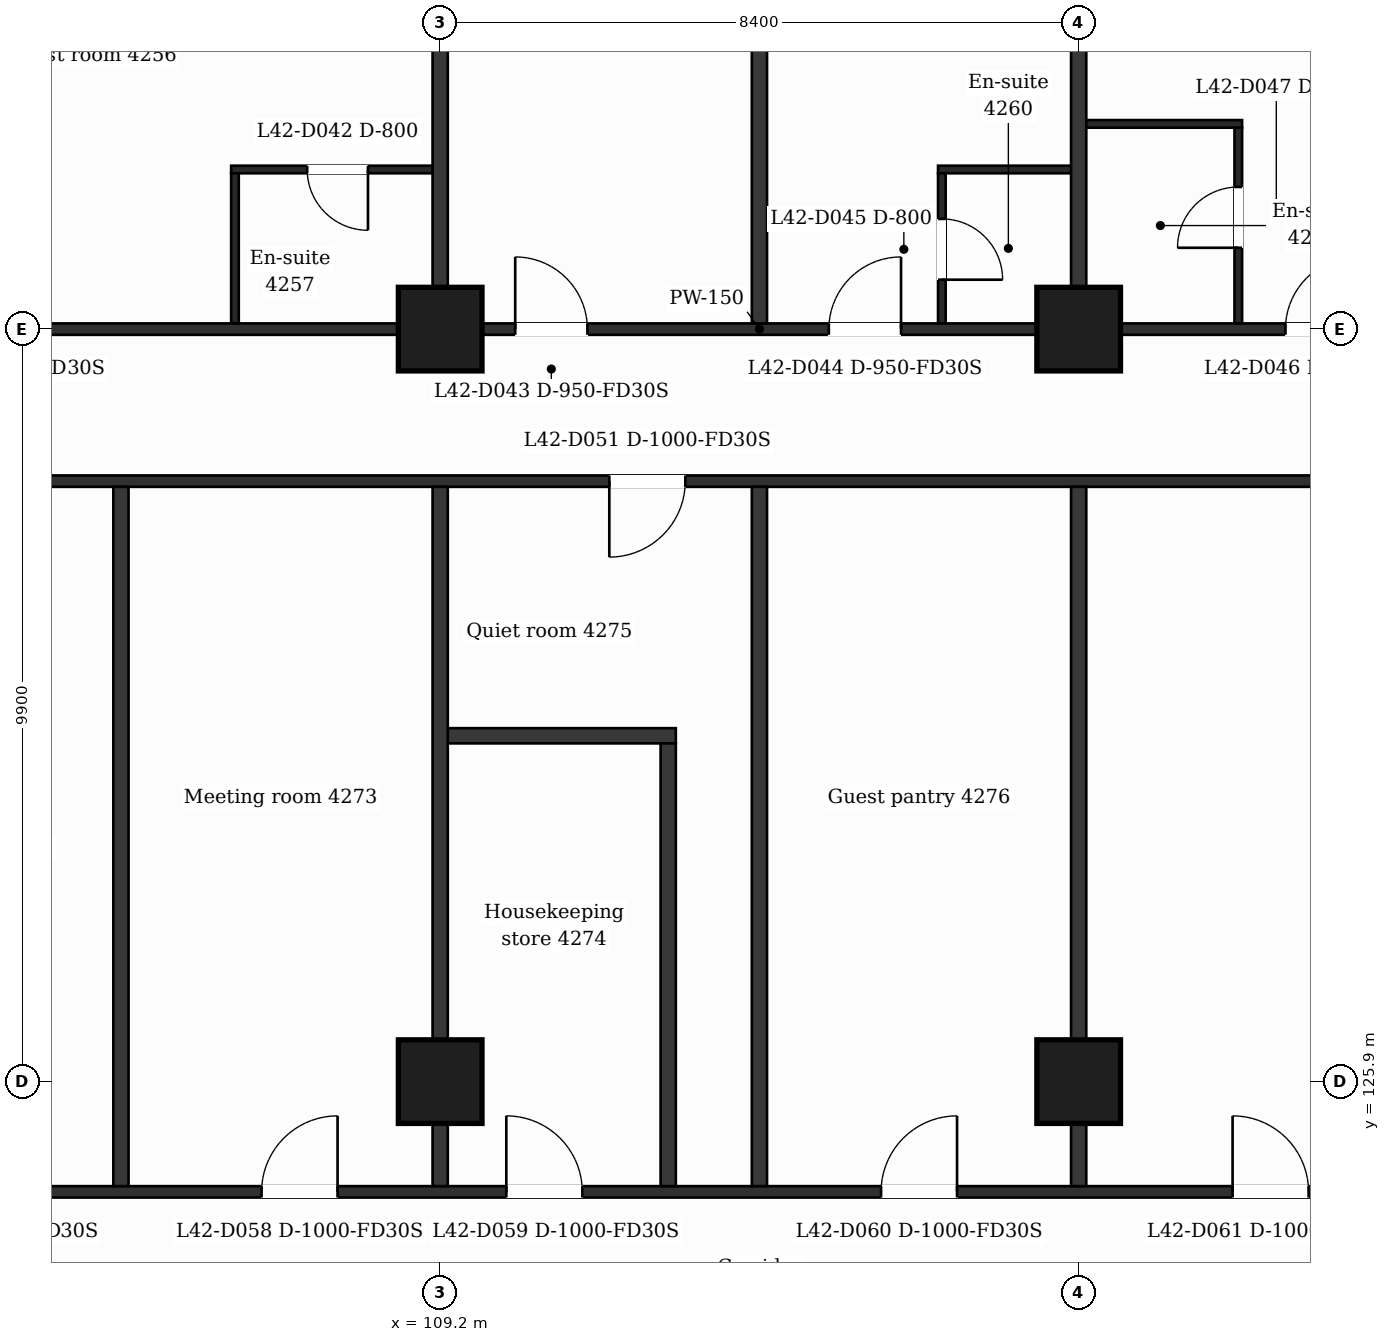
"""IFC4 building model, lengths in metres.
Left out: names, types, materials, properties, quantities, classifications, styles, units other than length and angle.
Written with IfcOpenShell. Run it as: python <this file> out.ifc"""

import sys

from ifc_helpers import new_model, si_unit, direction, frame, frame_2d, origin, origin_2d, place, context, subcontext, project, spatial, rectangle, extrude, element, fill, save


model = new_model("IFC4")
c1 = context("Model", 3, precision=1e-05, world=origin(), true_north=direction((0.0, 1.0)))
c2 = subcontext(c1, "Body", "Model", "MODEL_VIEW")
j1 = project(units=[si_unit("LENGTHUNIT", "METRE"), si_unit("PLANEANGLEUNIT", "RADIAN")], contexts=[c1])
p1 = place(None, origin())
s1 = spatial("IfcSite", under=j1, at=p1, CompositionType="ELEMENT")
p2 = place(p1, origin())
s2 = spatial("IfcBuilding", under=s1, at=p2, CompositionType="ELEMENT")
p3 = place(p2, frame((0.0, 0.0, 177.4)))
s3 = spatial("IfcBuildingStorey", under=s2, at=p3, CompositionType="ELEMENT", Elevation=177.4)
for number, where, z_axis, x_axis in (
    (1, (109.2, 125.9, 0.0), (0.0, 0.0, 1.0), (1.0, 0.0, 0.0)),
    (2, (117.6, 125.9, 0.0), (0.0, 0.0, 1.0), (1.0, 0.0, 0.0)),
    (3, (109.2, 135.8, 0.0), (0.0, 0.0, 1.0), (1.0, 0.0, 0.0)),
    (4, (117.6, 135.8, 0.0), (0.0, 0.0, 1.0), (1.0, 0.0, 0.0)),
):
    element("IfcColumn", number, at=place(p3, frame(where, z_axis=z_axis, x_axis=x_axis)), inside=s3, PredefinedType="COLUMN", context=c2, shape_type="SweptSolid", body=[
        extrude(rectangle(XDim=1.1, YDim=1.1, at=origin_2d()), origin(), (0.0, 0.0, 1.0), 3.7),
    ])
p4 = place(p3, frame((100.8, 124.45, 0.0), z_axis=(0.0, 0.0, 1.0), x_axis=(1.0, 0.0, 0.0)))
e5 = element("IfcWall", 5, at=p4, inside=s3, PredefinedType="PARTITIONING", context=c2, shape_type="SweptSolid", body=[
    extrude(rectangle(XDim=25.2, YDim=0.15, at=frame_2d((12.6, 0.0))), origin(), (0.0, 0.0, 1.0), 3.38),
])
p5 = place(p4, frame((0.975, 0.0, 0.0)))
e6 = element("IfcOpeningElement", 6, at=p5, cuts=e5, PredefinedType="OPENING", context=c2, shape_type="SweptSolid", body=[
    extrude(rectangle(XDim=1.0, YDim=2.1, at=frame_2d((0.5, 1.05))), frame((0.0, 0.085, 0.0), z_axis=(0.0, -1.0, 0.0), x_axis=(1.0, 0.0, 0.0)), (0.0, 0.0, 1.0), 0.17),
])
p6 = place(p4, frame((6.05, 0.0, 0.0)))
e7 = element("IfcOpeningElement", 7, at=p6, cuts=e5, PredefinedType="OPENING", context=c2, shape_type="SweptSolid", body=[
    extrude(rectangle(XDim=1.0, YDim=2.1, at=frame_2d((0.5, 1.05))), frame((0.0, 0.085, 0.0), z_axis=(0.0, -1.0, 0.0), x_axis=(1.0, 0.0, 0.0)), (0.0, 0.0, 1.0), 0.17),
])
p7 = place(p4, frame((9.27, 0.0, 0.0)))
e8 = element("IfcOpeningElement", 8, at=p7, cuts=e5, PredefinedType="OPENING", context=c2, shape_type="SweptSolid", body=[
    extrude(rectangle(XDim=1.0, YDim=2.1, at=frame_2d((0.5, 1.05))), frame((0.0, 0.085, 0.0), z_axis=(0.0, -1.0, 0.0), x_axis=(1.0, 0.0, 0.0)), (0.0, 0.0, 1.0), 0.17),
])
p8 = place(p4, frame((14.2, 0.0, 0.0)))
e9 = element("IfcOpeningElement", 9, at=p8, cuts=e5, PredefinedType="OPENING", context=c2, shape_type="SweptSolid", body=[
    extrude(rectangle(XDim=1.0, YDim=2.1, at=frame_2d((0.5, 1.05))), frame((0.0, 0.085, 0.0), z_axis=(0.0, -1.0, 0.0), x_axis=(1.0, 0.0, 0.0)), (0.0, 0.0, 1.0), 0.17),
])
p9 = place(p4, frame((18.825, 0.0, 0.0)))
e10 = element("IfcOpeningElement", 10, at=p9, cuts=e5, PredefinedType="OPENING", context=c2, shape_type="SweptSolid", body=[
    extrude(rectangle(XDim=1.0, YDim=2.1, at=frame_2d((0.5, 1.05))), frame((0.0, 0.085, 0.0), z_axis=(0.0, -1.0, 0.0), x_axis=(1.0, 0.0, 0.0)), (0.0, 0.0, 1.0), 0.17),
])
p10 = place(p3, frame((109.2, 130.45, 0.0), z_axis=(0.0, 0.0, 1.0), x_axis=(1.0, 0.0, 0.0)))
e11 = element("IfcWall", 11, at=p10, inside=s3, PredefinedType="PARTITIONING", context=c2, shape_type="SweptSolid", body=[
    extrude(rectangle(XDim=3.1, YDim=0.2, at=frame_2d((1.55, 0.0))), origin(), (0.0, 0.0, 1.0), 3.38),
])
p11 = place(p3, frame((100.725, 133.8, 0.0), z_axis=(0.0, 0.0, 1.0), x_axis=(1.0, 0.0, 0.0)))
e12 = element("IfcWall", 12, at=p11, inside=s3, PredefinedType="PARTITIONING", context=c2, shape_type="SweptSolid", body=[
    extrude(rectangle(XDim=25.35, YDim=0.15, at=frame_2d((12.675, 0.0))), origin(), (0.0, 0.0, 1.0), 3.38),
])
p12 = place(p11, frame((10.7, 0.0, 0.0)))
e13 = element("IfcOpeningElement", 13, at=p12, cuts=e12, PredefinedType="OPENING", context=c2, shape_type="SweptSolid", body=[
    extrude(rectangle(XDim=1.0, YDim=2.1, at=frame_2d((0.5, 1.05))), frame((0.0, 0.085, 0.0), z_axis=(0.0, -1.0, 0.0), x_axis=(1.0, 0.0, 0.0)), (0.0, 0.0, 1.0), 0.17),
])
p13 = place(p3, frame((90.895, 135.8, 0.0), z_axis=(0.0, 0.0, 1.0), x_axis=(1.0, 0.0, 0.0)))
e14 = element("IfcWall", 14, at=p13, inside=s3, PredefinedType="PARTITIONING", context=c2, shape_type="SweptSolid", body=[
    extrude(rectangle(XDim=45.011, YDim=0.15, at=frame_2d((22.505, 0.0))), origin(), (0.0, 0.0, 1.0), 3.38),
])
p14 = place(p13, frame((6.906, 0.0, 0.0)))
e15 = element("IfcOpeningElement", 15, at=p14, cuts=e14, PredefinedType="OPENING", context=c2, shape_type="SweptSolid", body=[
    extrude(rectangle(XDim=1.0, YDim=2.1, at=frame_2d((0.5, 1.05))), frame((0.0, 0.085, 0.0), z_axis=(0.0, -1.0, 0.0), x_axis=(1.0, 0.0, 0.0)), (0.0, 0.0, 1.0), 0.17),
])
p15 = place(p13, frame((11.875, 0.0, 0.0)))
e16 = element("IfcOpeningElement", 16, at=p15, cuts=e14, PredefinedType="OPENING", context=c2, shape_type="SweptSolid", body=[
    extrude(rectangle(XDim=0.95, YDim=2.1, at=frame_2d((0.475, 1.05))), frame((0.0, 0.085, 0.0), z_axis=(0.0, -1.0, 0.0), x_axis=(1.0, 0.0, 0.0)), (0.0, 0.0, 1.0), 0.17),
])
p16 = place(p13, frame((19.292, 0.0, 0.0)))
e17 = element("IfcOpeningElement", 17, at=p16, cuts=e14, PredefinedType="OPENING", context=c2, shape_type="SweptSolid", body=[
    extrude(rectangle(XDim=0.95, YDim=2.1, at=frame_2d((0.475, 1.05))), frame((0.0, 0.085, 0.0), z_axis=(0.0, -1.0, 0.0), x_axis=(1.0, 0.0, 0.0)), (0.0, 0.0, 1.0), 0.17),
])
p17 = place(p13, frame((23.418, 0.0, 0.0)))
e18 = element("IfcOpeningElement", 18, at=p17, cuts=e14, PredefinedType="OPENING", context=c2, shape_type="SweptSolid", body=[
    extrude(rectangle(XDim=0.95, YDim=2.1, at=frame_2d((0.475, 1.05))), frame((0.0, 0.085, 0.0), z_axis=(0.0, -1.0, 0.0), x_axis=(1.0, 0.0, 0.0)), (0.0, 0.0, 1.0), 0.17),
])
p18 = place(p13, frame((29.425, 0.0, 0.0)))
e19 = element("IfcOpeningElement", 19, at=p18, cuts=e14, PredefinedType="OPENING", context=c2, shape_type="SweptSolid", body=[
    extrude(rectangle(XDim=0.95, YDim=2.1, at=frame_2d((0.475, 1.05))), frame((0.0, 0.085, 0.0), z_axis=(0.0, -1.0, 0.0), x_axis=(1.0, 0.0, 0.0)), (0.0, 0.0, 1.0), 0.17),
])
p19 = place(p13, frame((31.63, 0.0, 0.0)))
e20 = element("IfcOpeningElement", 20, at=p19, cuts=e14, PredefinedType="OPENING", context=c2, shape_type="SweptSolid", body=[
    extrude(rectangle(XDim=0.95, YDim=2.1, at=frame_2d((0.475, 1.05))), frame((0.0, 0.085, 0.0), z_axis=(0.0, -1.0, 0.0), x_axis=(1.0, 0.0, 0.0)), (0.0, 0.0, 1.0), 0.17),
])
p20 = place(p13, frame((39.814, 0.0, 0.0)))
e21 = element("IfcOpeningElement", 21, at=p20, cuts=e14, PredefinedType="OPENING", context=c2, shape_type="SweptSolid", body=[
    extrude(rectangle(XDim=0.95, YDim=2.1, at=frame_2d((0.475, 1.05))), frame((0.0, 0.085, 0.0), z_axis=(0.0, -1.0, 0.0), x_axis=(1.0, 0.0, 0.0)), (0.0, 0.0, 1.0), 0.17),
])
p21 = place(p3, frame((106.45, 137.9, 0.0), z_axis=(0.0, 0.0, 1.0), x_axis=(1.0, 0.0, 0.0)))
e22 = element("IfcWall", 22, at=p21, inside=s3, PredefinedType="PARTITIONING", context=c2, shape_type="SweptSolid", body=[
    extrude(rectangle(XDim=2.75, YDim=0.1, at=frame_2d((1.375, 0.0))), origin(), (0.0, 0.0, 1.0), 3.38),
])
p22 = place(p21, frame((1.0, 0.0, 0.0)))
e23 = element("IfcOpeningElement", 23, at=p22, cuts=e22, PredefinedType="OPENING", context=c2, shape_type="SweptSolid", body=[
    extrude(rectangle(XDim=0.8, YDim=2.1, at=frame_2d((0.4, 1.05))), frame((0.0, 0.06, 0.0), z_axis=(0.0, -1.0, 0.0), x_axis=(1.0, 0.0, 0.0)), (0.0, 0.0, 1.0), 0.12),
])
p23 = place(p3, frame((115.75, 137.9, 0.0), z_axis=(0.0, 0.0, 1.0), x_axis=(1.0, 0.0, 0.0)))
e24 = element("IfcWall", 24, at=p23, inside=s3, PredefinedType="PARTITIONING", context=c2, shape_type="SweptSolid", body=[
    extrude(rectangle(XDim=1.85, YDim=0.1, at=frame_2d((0.925, 0.0))), origin(), (0.0, 0.0, 1.0), 3.38),
])
p24 = place(p3, frame((117.6, 138.5, 0.0), z_axis=(0.0, 0.0, 1.0), x_axis=(1.0, 0.0, 0.0)))
e25 = element("IfcWall", 25, at=p24, inside=s3, PredefinedType="PARTITIONING", context=c2, shape_type="SweptSolid", body=[
    extrude(rectangle(XDim=2.15, YDim=0.1, at=frame_2d((1.075, 0.0))), origin(), (0.0, 0.0, 1.0), 3.38),
])
p25 = place(p3, frame((105.0, 124.525, 0.0), z_axis=(0.0, 0.0, 1.0), x_axis=(0.0, 1.0, 0.0)))
e26 = element("IfcWall", 26, at=p25, inside=s3, PredefinedType="PARTITIONING", context=c2, shape_type="SweptSolid", body=[
    extrude(rectangle(XDim=9.2, YDim=0.2, at=frame_2d((4.6, 0.0))), origin(), (0.0, 0.0, 1.0), 3.38),
])
p26 = place(p3, frame((106.5, 135.875, 0.0), z_axis=(0.0, 0.0, 1.0), x_axis=(0.0, 1.0, 0.0)))
e27 = element("IfcWall", 27, at=p26, inside=s3, PredefinedType="PARTITIONING", context=c2, shape_type="SweptSolid", body=[
    extrude(rectangle(XDim=1.975, YDim=0.1, at=frame_2d((0.988, 0.0))), origin(), (0.0, 0.0, 1.0), 3.38),
])
p27 = place(p3, frame((109.2, 124.525, 0.0), z_axis=(0.0, 0.0, 1.0), x_axis=(0.0, 1.0, 0.0)))
e28 = element("IfcWall", 28, at=p27, inside=s3, PredefinedType="PARTITIONING", context=c2, shape_type="SweptSolid", body=[
    extrude(rectangle(XDim=9.2, YDim=0.2, at=frame_2d((4.6, 0.0))), origin(), (0.0, 0.0, 1.0), 3.38),
])
p28 = place(p3, frame((109.2, 135.875, 0.0), z_axis=(0.0, 0.0, 1.0), x_axis=(0.0, 1.0, 0.0)))
e29 = element("IfcWall", 29, at=p28, inside=s3, PredefinedType="PARTITIONING", context=c2, shape_type="SweptSolid", body=[
    extrude(rectangle(XDim=7.135, YDim=0.2, at=frame_2d((3.567, 0.0))), origin(), (0.0, 0.0, 1.0), 3.38),
])
p29 = place(p3, frame((112.2, 124.525, 0.0), z_axis=(0.0, 0.0, 1.0), x_axis=(0.0, 1.0, 0.0)))
e30 = element("IfcWall", 30, at=p29, inside=s3, PredefinedType="PARTITIONING", context=c2, shape_type="SweptSolid", body=[
    extrude(rectangle(XDim=5.825, YDim=0.2, at=frame_2d((2.913, 0.0))), origin(), (0.0, 0.0, 1.0), 3.38),
])
p30 = place(p3, frame((113.4, 124.525, 0.0), z_axis=(0.0, 0.0, 1.0), x_axis=(0.0, 1.0, 0.0)))
e31 = element("IfcWall", 31, at=p30, inside=s3, PredefinedType="PARTITIONING", context=c2, shape_type="SweptSolid", body=[
    extrude(rectangle(XDim=9.2, YDim=0.2, at=frame_2d((4.6, 0.0))), origin(), (0.0, 0.0, 1.0), 3.38),
])
p31 = place(p3, frame((113.4, 135.875, 0.0), z_axis=(0.0, 0.0, 1.0), x_axis=(0.0, 1.0, 0.0)))
e32 = element("IfcWall", 32, at=p31, inside=s3, PredefinedType="PARTITIONING", context=c2, shape_type="SweptSolid", body=[
    extrude(rectangle(XDim=8.085, YDim=0.2, at=frame_2d((4.042, 0.0))), origin(), (0.0, 0.0, 1.0), 3.38),
])
p32 = place(p3, frame((115.8, 135.875, 0.0), z_axis=(0.0, 0.0, 1.0), x_axis=(0.0, 1.0, 0.0)))
e33 = element("IfcWall", 33, at=p32, inside=s3, PredefinedType="PARTITIONING", context=c2, shape_type="SweptSolid", body=[
    extrude(rectangle(XDim=1.975, YDim=0.1, at=frame_2d((0.988, 0.0))), origin(), (0.0, 0.0, 1.0), 3.38),
])
p33 = place(p32, frame((0.575, 0.0, 0.0)))
e34 = element("IfcOpeningElement", 34, at=p33, cuts=e33, PredefinedType="OPENING", context=c2, shape_type="SweptSolid", body=[
    extrude(rectangle(XDim=0.8, YDim=2.1, at=frame_2d((0.4, 1.05))), frame((0.0, 0.06, 0.0), z_axis=(0.0, -1.0, 0.0), x_axis=(1.0, 0.0, 0.0)), (0.0, 0.0, 1.0), 0.12),
])
p34 = place(p3, frame((117.6, 124.525, 0.0), z_axis=(0.0, 0.0, 1.0), x_axis=(0.0, 1.0, 0.0)))
e35 = element("IfcWall", 35, at=p34, inside=s3, PredefinedType="PARTITIONING", context=c2, shape_type="SweptSolid", body=[
    extrude(rectangle(XDim=9.2, YDim=0.2, at=frame_2d((4.6, 0.0))), origin(), (0.0, 0.0, 1.0), 3.38),
])
p35 = place(p3, frame((117.6, 135.875, 0.0), z_axis=(0.0, 0.0, 1.0), x_axis=(0.0, 1.0, 0.0)))
e36 = element("IfcWall", 36, at=p35, inside=s3, PredefinedType="PARTITIONING", context=c2, shape_type="SweptSolid", body=[
    extrude(rectangle(XDim=7.135, YDim=0.2, at=frame_2d((3.567, 0.0))), origin(), (0.0, 0.0, 1.0), 3.38),
])
p36 = place(p3, frame((119.7, 135.875, 0.0), z_axis=(0.0, 0.0, 1.0), x_axis=(0.0, 1.0, 0.0)))
e37 = element("IfcWall", 37, at=p36, inside=s3, PredefinedType="PARTITIONING", context=c2, shape_type="SweptSolid", body=[
    extrude(rectangle(XDim=2.575, YDim=0.1, at=frame_2d((1.288, 0.0))), origin(), (0.0, 0.0, 1.0), 3.38),
])
p37 = place(p36, frame((0.995, 0.0, 0.0)))
e38 = element("IfcOpeningElement", 38, at=p37, cuts=e37, PredefinedType="OPENING", context=c2, shape_type="SweptSolid", body=[
    extrude(rectangle(XDim=0.8, YDim=2.1, at=frame_2d((0.4, 1.05))), frame((0.0, 0.06, 0.0), z_axis=(0.0, -1.0, 0.0), x_axis=(1.0, 0.0, 0.0)), (0.0, 0.0, 1.0), 0.12),
])
p38 = place(p22, origin())
e39 = element("IfcDoor", 39, at=p38, inside=s3, OperationType="SINGLE_SWING_RIGHT", PredefinedType="DOOR", context=c2, shape_type="SweptSolid", body=[
    extrude(rectangle(XDim=0.8, YDim=2.1, at=frame_2d((0.4, 1.05))), frame((0.0, 0.025, 0.0), z_axis=(0.0, -1.0, 0.0), x_axis=(1.0, 0.0, 0.0)), (0.0, 0.0, 1.0), 0.05),
])
fill(e23, e39)
p39 = place(p16, origin())
e40 = element("IfcDoor", 40, at=p39, inside=s3, OperationType="SINGLE_SWING_LEFT", PredefinedType="DOOR", context=c2, shape_type="SweptSolid", body=[
    extrude(rectangle(XDim=0.95, YDim=2.1, at=frame_2d((0.475, 1.05))), frame((0.0, 0.025, 0.0), z_axis=(0.0, -1.0, 0.0), x_axis=(1.0, 0.0, 0.0)), (0.0, 0.0, 1.0), 0.05),
])
fill(e17, e40)
p40 = place(p17, origin())
e41 = element("IfcDoor", 41, at=p40, inside=s3, OperationType="SINGLE_SWING_RIGHT", PredefinedType="DOOR", context=c2, shape_type="SweptSolid", body=[
    extrude(rectangle(XDim=0.95, YDim=2.1, at=frame_2d((0.475, 1.05))), frame((0.0, 0.025, 0.0), z_axis=(0.0, -1.0, 0.0), x_axis=(1.0, 0.0, 0.0)), (0.0, 0.0, 1.0), 0.05),
])
fill(e18, e41)
p41 = place(p33, origin())
e42 = element("IfcDoor", 42, at=p41, inside=s3, OperationType="SINGLE_SWING_LEFT", PredefinedType="DOOR", context=c2, shape_type="SweptSolid", body=[
    extrude(rectangle(XDim=0.8, YDim=2.1, at=frame_2d((0.4, 1.05))), frame((0.0, 0.025, 0.0), z_axis=(0.0, -1.0, 0.0), x_axis=(1.0, 0.0, 0.0)), (0.0, 0.0, 1.0), 0.05),
])
fill(e34, e42)
p42 = place(p18, origin())
e43 = element("IfcDoor", 43, at=p42, inside=s3, OperationType="SINGLE_SWING_RIGHT", PredefinedType="DOOR", context=c2, shape_type="SweptSolid", body=[
    extrude(rectangle(XDim=0.95, YDim=2.1, at=frame_2d((0.475, 1.05))), frame((0.0, 0.025, 0.0), z_axis=(0.0, -1.0, 0.0), x_axis=(1.0, 0.0, 0.0)), (0.0, 0.0, 1.0), 0.05),
])
fill(e19, e43)
p43 = place(p37, origin())
e44 = element("IfcDoor", 44, at=p43, inside=s3, OperationType="SINGLE_SWING_LEFT", PredefinedType="DOOR", context=c2, shape_type="SweptSolid", body=[
    extrude(rectangle(XDim=0.8, YDim=2.1, at=frame_2d((0.4, 1.05))), frame((0.0, 0.025, 0.0), z_axis=(0.0, -1.0, 0.0), x_axis=(1.0, 0.0, 0.0)), (0.0, 0.0, 1.0), 0.05),
])
fill(e38, e44)
p44 = place(p12, origin())
e45 = element("IfcDoor", 45, at=p44, inside=s3, OperationType="SINGLE_SWING_LEFT", PredefinedType="DOOR", context=c2, shape_type="SweptSolid", body=[
    extrude(rectangle(XDim=1.0, YDim=2.1, at=frame_2d((0.5, 1.05))), frame((0.0, 0.025, 0.0), z_axis=(0.0, -1.0, 0.0), x_axis=(1.0, 0.0, 0.0)), (0.0, 0.0, 1.0), 0.05),
])
fill(e13, e45)
p45 = place(p6, origin())
e46 = element("IfcDoor", 46, at=p45, inside=s3, OperationType="SINGLE_SWING_RIGHT", PredefinedType="DOOR", context=c2, shape_type="SweptSolid", body=[
    extrude(rectangle(XDim=1.0, YDim=2.1, at=frame_2d((0.5, 1.05))), frame((0.0, 0.025, 0.0), z_axis=(0.0, -1.0, 0.0), x_axis=(1.0, 0.0, 0.0)), (0.0, 0.0, 1.0), 0.05),
])
fill(e7, e46)
p46 = place(p7, origin())
e47 = element("IfcDoor", 47, at=p46, inside=s3, OperationType="SINGLE_SWING_LEFT", PredefinedType="DOOR", context=c2, shape_type="SweptSolid", body=[
    extrude(rectangle(XDim=1.0, YDim=2.1, at=frame_2d((0.5, 1.05))), frame((0.0, 0.025, 0.0), z_axis=(0.0, -1.0, 0.0), x_axis=(1.0, 0.0, 0.0)), (0.0, 0.0, 1.0), 0.05),
])
fill(e8, e47)
p47 = place(p8, origin())
e48 = element("IfcDoor", 48, at=p47, inside=s3, OperationType="SINGLE_SWING_RIGHT", PredefinedType="DOOR", context=c2, shape_type="SweptSolid", body=[
    extrude(rectangle(XDim=1.0, YDim=2.1, at=frame_2d((0.5, 1.05))), frame((0.0, 0.025, 0.0), z_axis=(0.0, -1.0, 0.0), x_axis=(1.0, 0.0, 0.0)), (0.0, 0.0, 1.0), 0.05),
])
fill(e9, e48)
p48 = place(p9, origin())
e49 = element("IfcDoor", 49, at=p48, inside=s3, OperationType="SINGLE_SWING_LEFT", PredefinedType="DOOR", context=c2, shape_type="SweptSolid", body=[
    extrude(rectangle(XDim=1.0, YDim=2.1, at=frame_2d((0.5, 1.05))), frame((0.0, 0.025, 0.0), z_axis=(0.0, -1.0, 0.0), x_axis=(1.0, 0.0, 0.0)), (0.0, 0.0, 1.0), 0.05),
])
fill(e10, e49)
save(model, sys.argv[1])
